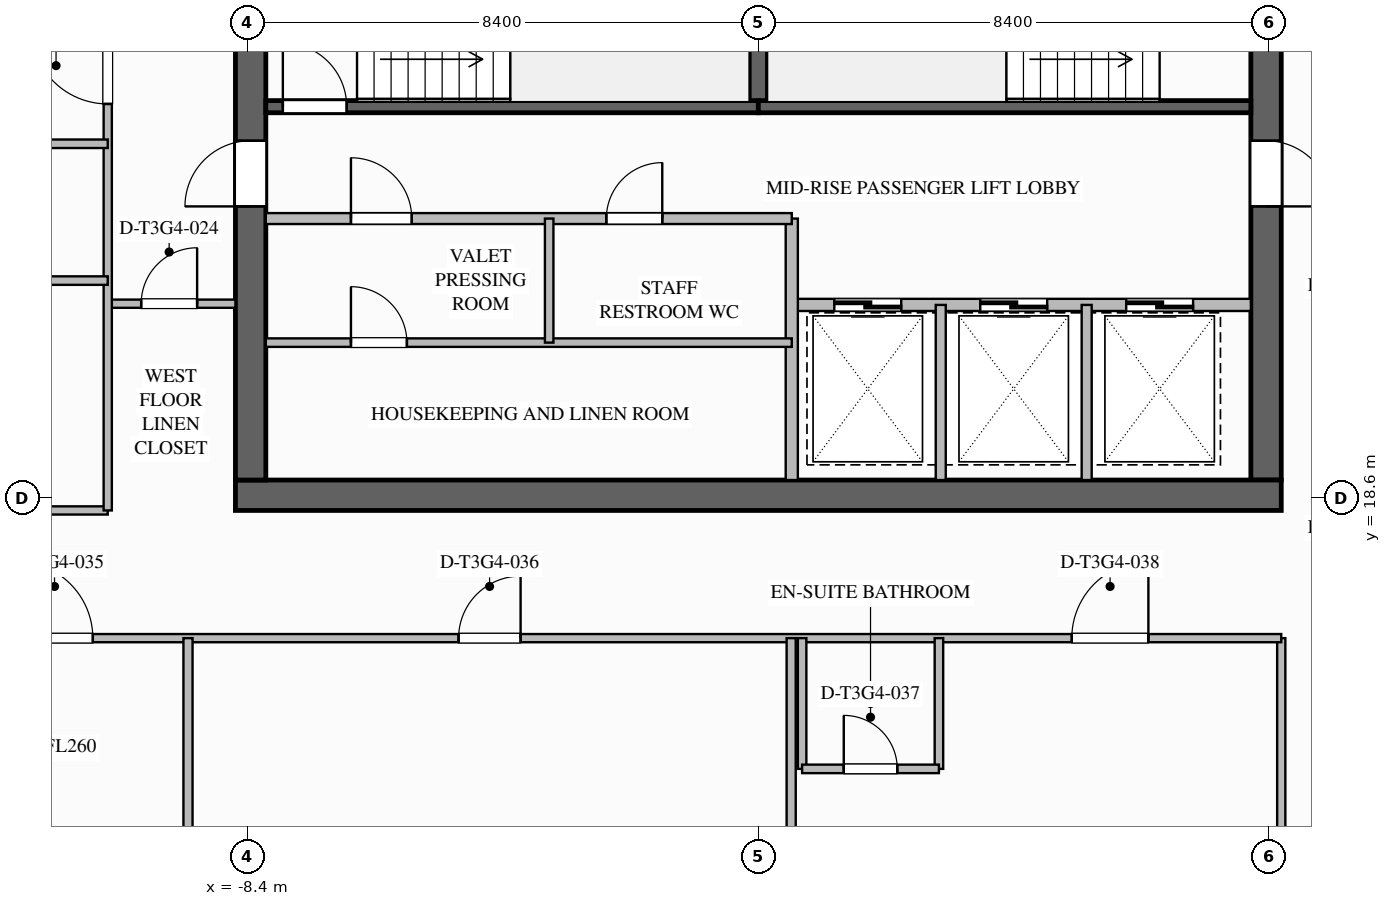
"""IFC4 building model, lengths in metres.
Left out: names, types, materials, properties, quantities, classifications, styles, units other than length and angle.
Written with IfcOpenShell. Run it as: python <this file> out.ifc"""

import sys

from ifc_helpers import new_model, si_unit, direction, frame, frame_2d, origin, place, context, subcontext, project, spatial, rectangle, extrude, element, fill, save


model = new_model("IFC4")
c1 = context("Model", 3, precision=1e-05, world=origin(), true_north=direction((0.0, 1.0)))
c2 = subcontext(c1, "Body", "Model", "MODEL_VIEW")
j1 = project(units=[si_unit("LENGTHUNIT", "METRE"), si_unit("PLANEANGLEUNIT", "RADIAN")], contexts=[c1])
p1 = place(None, origin())
s1 = spatial("IfcSite", under=j1, at=p1, CompositionType="ELEMENT")
p2 = place(p1, origin())
s2 = spatial("IfcBuilding", under=s1, at=p2, CompositionType="ELEMENT")
p3 = place(p2, frame((0.0, 0.0, 182.35)))
s3 = spatial("IfcBuildingStorey", under=s2, at=p3, CompositionType="ELEMENT", Elevation=182.35)
p4 = place(p3, frame((8.35, 35.1, 0.0), z_axis=(0.0, 0.0, 1.0), x_axis=(0.0, -1.0, 0.0)))
e1 = element("IfcWall", 1, at=p4, inside=s3, PredefinedType="SHEAR", context=c2, shape_type="SweptSolid", body=[
    extrude(rectangle(XDim=16.2, YDim=0.5, at=frame_2d((8.1, 0.0))), origin(), (0.0, 0.0, 1.0), 3.55),
])
p5 = place(p4, frame((3.08, 0.0, 0.0)))
e2 = element("IfcOpeningElement", 2, at=p5, cuts=e1, PredefinedType="OPENING", context=c2, shape_type="SweptSolid", body=[
    extrude(rectangle(XDim=1.12, YDim=2.1, at=frame_2d((0.56, 1.05))), frame((0.0, 0.26, 0.0), z_axis=(0.0, -1.0, 0.0), x_axis=(1.0, 0.0, 0.0)), (0.0, 0.0, 1.0), 0.52),
])
p6 = place(p4, frame((10.62, 0.0, 0.0)))
e3 = element("IfcOpeningElement", 3, at=p6, cuts=e1, PredefinedType="OPENING", context=c2, shape_type="SweptSolid", body=[
    extrude(rectangle(XDim=1.08, YDim=2.04, at=frame_2d((0.54, 1.02))), frame((0.0, 0.26, 0.0), z_axis=(0.0, -1.0, 0.0), x_axis=(1.0, 0.0, 0.0)), (0.0, 0.0, 1.0), 0.52),
])
p7 = place(p3, frame((8.6, 18.65, 0.0), z_axis=(0.0, 0.0, 1.0), x_axis=(-1.0, 0.0, 0.0)))
e4 = element("IfcWall", 4, at=p7, inside=s3, PredefinedType="SHEAR", context=c2, shape_type="SweptSolid", body=[
    extrude(rectangle(XDim=17.2, YDim=0.5, at=frame_2d((8.6, 0.0))), origin(), (0.0, 0.0, 1.0), 3.55),
])
p8 = place(p3, frame((-8.35, 18.9, 0.0), z_axis=(0.0, 0.0, 1.0), x_axis=(0.0, 1.0, 0.0)))
e5 = element("IfcWall", 5, at=p8, inside=s3, PredefinedType="SHEAR", context=c2, shape_type="SweptSolid", body=[
    extrude(rectangle(XDim=16.2, YDim=0.5, at=frame_2d((8.1, 0.0))), origin(), (0.0, 0.0, 1.0), 3.55),
])
p9 = place(p8, frame((12.02, 0.0, 0.0)))
e6 = element("IfcOpeningElement", 6, at=p9, cuts=e5, PredefinedType="OPENING", context=c2, shape_type="SweptSolid", body=[
    extrude(rectangle(XDim=1.08, YDim=2.04, at=frame_2d((0.54, 1.02))), frame((0.0, 0.26, 0.0), z_axis=(0.0, -1.0, 0.0), x_axis=(1.0, 0.0, 0.0)), (0.0, 0.0, 1.0), 0.52),
])
p10 = place(p8, frame((4.5, 0.0, 0.0)))
e7 = element("IfcOpeningElement", 7, at=p10, cuts=e5, PredefinedType="OPENING", context=c2, shape_type="SweptSolid", body=[
    extrude(rectangle(XDim=1.08, YDim=2.04, at=frame_2d((0.54, 1.02))), frame((0.0, 0.26, 0.0), z_axis=(0.0, -1.0, 0.0), x_axis=(1.0, 0.0, 0.0)), (0.0, 0.0, 1.0), 0.52),
])
p11 = place(p3, frame((0.0, 25.04, 0.0), z_axis=(0.0, 0.0, 1.0), x_axis=(0.0, 1.0, 0.0)))
e8 = element("IfcWall", 8, at=p11, inside=s3, PredefinedType="SOLIDWALL", context=c2, shape_type="SweptSolid", body=[
    extrude(rectangle(XDim=3.12, YDim=0.3, at=frame_2d((1.56, 0.0))), origin(), (0.0, 0.0, 1.0), 3.29),
])
p12 = place(p3, frame((-8.1, 25.04, 0.0), z_axis=(0.0, 0.0, 1.0), x_axis=(1.0, 0.0, 0.0)))
e9 = element("IfcWall", 9, at=p12, inside=s3, PredefinedType="SOLIDWALL", context=c2, shape_type="SweptSolid", body=[
    extrude(rectangle(XDim=8.1, YDim=0.2, at=frame_2d((4.05, 0.0))), origin(), (0.0, 0.0, 1.0), 3.29),
])
p13 = place(p12, frame((0.28, 0.0, 0.0)))
e10 = element("IfcOpeningElement", 10, at=p13, cuts=e9, PredefinedType="OPENING", context=c2, shape_type="SweptSolid", body=[
    extrude(rectangle(XDim=1.05, YDim=2.1, at=frame_2d((0.525, 1.05))), frame((0.0, 0.11, 0.0), z_axis=(0.0, -1.0, 0.0), x_axis=(1.0, 0.0, 0.0)), (0.0, 0.0, 1.0), 0.22),
])
p14 = place(p3, frame((0.0, 25.04, 0.0), z_axis=(0.0, 0.0, 1.0), x_axis=(1.0, 0.0, 0.0)))
e11 = element("IfcWall", 11, at=p14, inside=s3, PredefinedType="SOLIDWALL", context=c2, shape_type="SweptSolid", body=[
    extrude(rectangle(XDim=8.1, YDim=0.2, at=frame_2d((4.05, 0.0))), origin(), (0.0, 0.0, 1.0), 3.29),
])
p15 = place(p3, frame((8.1, 21.78, 0.0), z_axis=(0.0, 0.0, 1.0), x_axis=(-1.0, 0.0, 0.0)))
e12 = element("IfcWall", 12, at=p15, inside=s3, PredefinedType="SOLIDWALL", context=c2, shape_type="SweptSolid", body=[
    extrude(rectangle(XDim=7.55, YDim=0.2, at=frame_2d((3.775, 0.0))), origin(), (0.0, 0.0, 1.0), 3.29),
])
p16 = place(p15, frame((5.75, 0.0, 0.0)))
e13 = element("IfcOpeningElement", 13, at=p16, cuts=e12, PredefinedType="OPENING", context=c2, shape_type="SweptSolid", body=[
    extrude(rectangle(XDim=1.1, YDim=2.2, at=frame_2d((0.55, 1.1))), frame((0.0, 0.11, 0.0), z_axis=(0.0, -1.0, 0.0), x_axis=(1.0, 0.0, 0.0)), (0.0, 0.0, 1.0), 0.22),
])
p17 = place(p15, frame((3.35, 0.0, 0.0)))
e14 = element("IfcOpeningElement", 14, at=p17, cuts=e12, PredefinedType="OPENING", context=c2, shape_type="SweptSolid", body=[
    extrude(rectangle(XDim=1.1, YDim=2.2, at=frame_2d((0.55, 1.1))), frame((0.0, 0.11, 0.0), z_axis=(0.0, -1.0, 0.0), x_axis=(1.0, 0.0, 0.0)), (0.0, 0.0, 1.0), 0.22),
])
p18 = place(p15, frame((0.95, 0.0, 0.0)))
e15 = element("IfcOpeningElement", 15, at=p18, cuts=e12, PredefinedType="OPENING", context=c2, shape_type="SweptSolid", body=[
    extrude(rectangle(XDim=1.1, YDim=2.2, at=frame_2d((0.55, 1.1))), frame((0.0, 0.11, 0.0), z_axis=(0.0, -1.0, 0.0), x_axis=(1.0, 0.0, 0.0)), (0.0, 0.0, 1.0), 0.22),
])
p19 = place(p3, frame((0.55, 18.9, 0.0), z_axis=(0.0, 0.0, 1.0), x_axis=(0.0, 1.0, 0.0)))
e16 = element("IfcWall", 16, at=p19, inside=s3, PredefinedType="SOLIDWALL", context=c2, shape_type="SweptSolid", body=[
    extrude(rectangle(XDim=4.3, YDim=0.2, at=frame_2d((2.15, 0.0))), origin(), (0.0, 0.0, 1.0), 3.29),
])
for number, where, z_axis, x_axis in (
    (17, (3.0, 18.9, 0.0), (0.0, 0.0, 1.0), (0.0, 1.0, 0.0)),
    (18, (5.4, 18.9, 0.0), (0.0, 0.0, 1.0), (0.0, 1.0, 0.0)),
):
    element("IfcWall", number, at=place(p3, frame(where, z_axis=z_axis, x_axis=x_axis)), inside=s3, PredefinedType="PARTITIONING", context=c2, shape_type="SweptSolid", body=[
        extrude(rectangle(XDim=2.88, YDim=0.165, at=frame_2d((1.44, 0.0))), origin(), (0.0, 0.0, 1.0), 3.29),
    ])
p20 = place(p3, frame((-8.1, 23.2, 0.0), z_axis=(0.0, 0.0, 1.0), x_axis=(1.0, 0.0, 0.0)))
e19 = element("IfcWall", 19, at=p20, inside=s3, PredefinedType="SOLIDWALL", context=c2, shape_type="SweptSolid", body=[
    extrude(rectangle(XDim=8.65, YDim=0.18, at=frame_2d((4.325, 0.0))), origin(), (0.0, 0.0, 1.0), 3.29),
])
p21 = place(p20, frame((1.4, 0.0, 0.0)))
e20 = element("IfcOpeningElement", 20, at=p21, cuts=e19, PredefinedType="OPENING", context=c2, shape_type="SweptSolid", body=[
    extrude(rectangle(XDim=1.0, YDim=2.1, at=frame_2d((0.5, 1.05))), frame((0.0, 0.1, 0.0), z_axis=(0.0, -1.0, 0.0), x_axis=(1.0, 0.0, 0.0)), (0.0, 0.0, 1.0), 0.2),
])
p22 = place(p20, frame((5.6, 0.0, 0.0)))
e21 = element("IfcOpeningElement", 21, at=p22, cuts=e19, PredefinedType="OPENING", context=c2, shape_type="SweptSolid", body=[
    extrude(rectangle(XDim=0.92, YDim=2.1, at=frame_2d((0.46, 1.05))), frame((0.0, 0.1, 0.0), z_axis=(0.0, -1.0, 0.0), x_axis=(1.0, 0.0, 0.0)), (0.0, 0.0, 1.0), 0.2),
])
p23 = place(p3, frame((-8.1, 21.16, 0.0), z_axis=(0.0, 0.0, 1.0), x_axis=(1.0, 0.0, 0.0)))
e22 = element("IfcWall", 22, at=p23, inside=s3, PredefinedType="PLUMBINGWALL", context=c2, shape_type="SweptSolid", body=[
    extrude(rectangle(XDim=8.65, YDim=0.14, at=frame_2d((4.325, 0.0))), origin(), (0.0, 0.0, 1.0), 3.29),
])
p24 = place(p23, frame((1.4, 0.0, 0.0)))
e23 = element("IfcOpeningElement", 23, at=p24, cuts=e22, PredefinedType="OPENING", context=c2, shape_type="SweptSolid", body=[
    extrude(rectangle(XDim=0.92, YDim=2.1, at=frame_2d((0.46, 1.05))), frame((0.0, 0.08, 0.0), z_axis=(0.0, -1.0, 0.0), x_axis=(1.0, 0.0, 0.0)), (0.0, 0.0, 1.0), 0.16),
])
p25 = place(p3, frame((-3.44, 21.16, 0.0), z_axis=(0.0, 0.0, 1.0), x_axis=(0.0, 1.0, 0.0)))
e24 = element("IfcWall", 24, at=p25, inside=s3, PredefinedType="PLUMBINGWALL", context=c2, shape_type="SweptSolid", body=[
    extrude(rectangle(XDim=2.04, YDim=0.14, at=frame_2d((1.02, 0.0))), origin(), (0.0, 0.0, 1.0), 3.29),
])
p26 = place(p3, frame((-10.7, 21.8, 0.0), z_axis=(0.0, 0.0, 1.0), x_axis=(1.0, 0.0, 0.0)))
e25 = element("IfcWall", 25, at=p26, inside=s3, PredefinedType="PARTITIONING", context=c2, shape_type="SweptSolid", body=[
    extrude(rectangle(XDim=2.1, YDim=0.135, at=frame_2d((1.05, 0.0))), origin(), (0.0, 0.0, 1.0), 3.29),
])
p27 = place(p26, frame((0.55, 0.0, 0.0)))
e26 = element("IfcOpeningElement", 26, at=p27, cuts=e25, PredefinedType="OPENING", context=c2, shape_type="SweptSolid", body=[
    extrude(rectangle(XDim=0.92, YDim=2.1, at=frame_2d((0.46, 1.05))), frame((0.0, 0.077, 0.0), z_axis=(0.0, -1.0, 0.0), x_axis=(1.0, 0.0, 0.0)), (0.0, 0.0, 1.0), 0.155),
])
for number, where, z_axis, x_axis in (
    (27, (8.6, 10.8, 0.0), (0.0, 0.0, 1.0), (0.0, 1.0, 0.0)),
    (28, (-16.2, 18.4, 0.0), (0.0, 0.0, 1.0), (1.0, 0.0, 0.0)),
):
    element("IfcWall", number, at=place(p3, frame(where, z_axis=z_axis, x_axis=x_axis)), inside=s3, PredefinedType="PARTITIONING", context=c2, shape_type="SweptSolid", body=[
        extrude(rectangle(XDim=5.5, YDim=0.135, at=frame_2d((2.75, 0.0))), origin(), (0.0, 0.0, 1.0), 2.667),
    ])
p28 = place(p3, frame((-16.2, 16.3, 0.0), z_axis=(0.0, 0.0, 1.0), x_axis=(1.0, 0.0, 0.0)))
e29 = element("IfcWall", 29, at=p28, inside=s3, PredefinedType="PARTITIONING", context=c2, shape_type="SweptSolid", body=[
    extrude(rectangle(XDim=24.8, YDim=0.135, at=frame_2d((12.4, 0.0))), origin(), (0.0, 0.0, 1.0), 3.29),
])
p29 = place(p28, frame((3.995, 0.0, 0.0)))
e30 = element("IfcOpeningElement", 30, at=p29, cuts=e29, PredefinedType="OPENING", context=c2, shape_type="SweptSolid", body=[
    extrude(rectangle(XDim=1.26, YDim=2.2, at=frame_2d((0.63, 1.1))), frame((0.0, 0.077, 0.0), z_axis=(0.0, -1.0, 0.0), x_axis=(1.0, 0.0, 0.0)), (0.0, 0.0, 1.0), 0.155),
])
p30 = place(p28, frame((11.27, 0.0, 0.0)))
e31 = element("IfcOpeningElement", 31, at=p30, cuts=e29, PredefinedType="OPENING", context=c2, shape_type="SweptSolid", body=[
    extrude(rectangle(XDim=1.02, YDim=2.15, at=frame_2d((0.51, 1.075))), frame((0.0, 0.077, 0.0), z_axis=(0.0, -1.0, 0.0), x_axis=(1.0, 0.0, 0.0)), (0.0, 0.0, 1.0), 0.155),
])
p31 = place(p28, frame((21.355, 0.0, 0.0)))
e32 = element("IfcOpeningElement", 32, at=p31, cuts=e29, PredefinedType="OPENING", context=c2, shape_type="SweptSolid", body=[
    extrude(rectangle(XDim=1.26, YDim=2.2, at=frame_2d((0.63, 1.1))), frame((0.0, 0.077, 0.0), z_axis=(0.0, -1.0, 0.0), x_axis=(1.0, 0.0, 0.0)), (0.0, 0.0, 1.0), 0.155),
])
p32 = place(p3, frame((-10.7, 18.4, 0.0), z_axis=(0.0, 0.0, 1.0), x_axis=(0.0, 1.0, 0.0)))
e33 = element("IfcWall", 33, at=p32, inside=s3, PredefinedType="PARTITIONING", context=c2, shape_type="SweptSolid", body=[
    extrude(rectangle(XDim=17.2, YDim=0.135, at=frame_2d((8.6, 0.0))), origin(), (0.0, 0.0, 1.0), 3.29),
])
p33 = place(p32, frame((6.685, 0.0, 0.0)))
e34 = element("IfcOpeningElement", 34, at=p33, cuts=e33, PredefinedType="OPENING", context=c2, shape_type="SweptSolid", body=[
    extrude(rectangle(XDim=1.26, YDim=2.2, at=frame_2d((0.63, 1.1))), frame((0.0, 0.077, 0.0), z_axis=(0.0, -1.0, 0.0), x_axis=(1.0, 0.0, 0.0)), (0.0, 0.0, 1.0), 0.155),
])
p34 = place(p32, frame((10.59, 0.0, 0.0)))
e35 = element("IfcOpeningElement", 35, at=p34, cuts=e33, PredefinedType="OPENING", context=c2, shape_type="SweptSolid", body=[
    extrude(rectangle(XDim=1.02, YDim=2.15, at=frame_2d((0.51, 1.075))), frame((0.0, 0.077, 0.0), z_axis=(0.0, -1.0, 0.0), x_axis=(1.0, 0.0, 0.0)), (0.0, 0.0, 1.0), 0.155),
])
p35 = place(p3, frame((-9.38, 0.12, 0.0), z_axis=(0.0, 0.0, 1.0), x_axis=(0.0, 1.0, 0.0)))
e36 = element("IfcWall", 36, at=p35, inside=s3, PredefinedType="PARTITIONING", context=c2, shape_type="SweptSolid", body=[
    extrude(rectangle(XDim=16.18, YDim=0.15, at=frame_2d((8.09, 0.0))), origin(), (0.0, 0.0, 1.0), 3.29),
])
p36 = place(p3, frame((0.54, 0.8, 0.0), z_axis=(0.0, 0.0, 1.0), x_axis=(0.0, 1.0, 0.0)))
e37 = element("IfcWall", 37, at=p36, inside=s3, PredefinedType="PARTITIONING", context=c2, shape_type="SweptSolid", body=[
    extrude(rectangle(XDim=15.5, YDim=0.15, at=frame_2d((7.75, 0.0))), origin(), (0.0, 0.0, 1.0), 3.29),
])
for number, where, z_axis, x_axis in (
    (38, (0.72, 16.3, 0.0), (0.0, 0.0, 1.0), (0.0, -1.0, 0.0)),
    (39, (2.97, 16.3, 0.0), (0.0, 0.0, 1.0), (0.0, -1.0, 0.0)),
):
    element("IfcWall", number, at=place(p3, frame(where, z_axis=z_axis, x_axis=x_axis)), inside=s3, PredefinedType="PLUMBINGWALL", context=c2, shape_type="SweptSolid", body=[
        extrude(rectangle(XDim=2.15, YDim=0.14, at=frame_2d((1.075, 0.0))), origin(), (0.0, 0.0, 1.0), 3.29),
    ])
p37 = place(p3, frame((0.72, 14.15, 0.0), z_axis=(0.0, 0.0, 1.0), x_axis=(1.0, 0.0, 0.0)))
e40 = element("IfcWall", 40, at=p37, inside=s3, PredefinedType="PLUMBINGWALL", context=c2, shape_type="SweptSolid", body=[
    extrude(rectangle(XDim=2.25, YDim=0.14, at=frame_2d((1.125, 0.0))), origin(), (0.0, 0.0, 1.0), 3.29),
])
p38 = place(p37, frame((0.685, 0.0, 0.0)))
e41 = element("IfcOpeningElement", 41, at=p38, cuts=e40, PredefinedType="OPENING", context=c2, shape_type="SweptSolid", body=[
    extrude(rectangle(XDim=0.88, YDim=2.1, at=frame_2d((0.44, 1.05))), frame((0.0, 0.08, 0.0), z_axis=(0.0, -1.0, 0.0), x_axis=(1.0, 0.0, 0.0)), (0.0, 0.0, 1.0), 0.16),
])
for number, where, z_axis, x_axis in (
    (42, (-10.7, 22.18, 0.0), (0.0, 0.0, 1.0), (-1.0, 0.0, 0.0)),
    (43, (-10.7, 24.43, 0.0), (0.0, 0.0, 1.0), (-1.0, 0.0, 0.0)),
):
    element("IfcWall", number, at=place(p3, frame(where, z_axis=z_axis, x_axis=x_axis)), inside=s3, PredefinedType="PLUMBINGWALL", context=c2, shape_type="SweptSolid", body=[
        extrude(rectangle(XDim=2.15, YDim=0.14, at=frame_2d((1.075, 0.0))), origin(), (0.0, 0.0, 1.0), 3.29),
    ])
p39 = place(p13, origin())
e44 = element("IfcDoor", 44, at=p39, inside=s3, OperationType="SINGLE_SWING_LEFT", PredefinedType="DOOR", context=c2, shape_type="SweptSolid", body=[
    extrude(rectangle(XDim=1.05, YDim=2.1, at=frame_2d((0.525, 1.05))), frame((0.0, 0.025, 0.0), z_axis=(0.0, -1.0, 0.0), x_axis=(1.0, 0.0, 0.0)), (0.0, 0.0, 1.0), 0.05),
])
fill(e10, e44)
p40 = place(p16, origin())
e45 = element("IfcDoor", 45, at=p40, inside=s3, OperationType="SLIDING_TO_LEFT", PredefinedType="DOOR", context=c2, shape_type="SweptSolid", body=[
    extrude(rectangle(XDim=1.1, YDim=2.2, at=frame_2d((0.55, 1.1))), frame((0.0, 0.025, 0.0), z_axis=(0.0, -1.0, 0.0), x_axis=(1.0, 0.0, 0.0)), (0.0, 0.0, 1.0), 0.05),
])
fill(e13, e45)
p41 = place(p17, origin())
e46 = element("IfcDoor", 46, at=p41, inside=s3, OperationType="SLIDING_TO_LEFT", PredefinedType="DOOR", context=c2, shape_type="SweptSolid", body=[
    extrude(rectangle(XDim=1.1, YDim=2.2, at=frame_2d((0.55, 1.1))), frame((0.0, 0.025, 0.0), z_axis=(0.0, -1.0, 0.0), x_axis=(1.0, 0.0, 0.0)), (0.0, 0.0, 1.0), 0.05),
])
fill(e14, e46)
p42 = place(p18, origin())
e47 = element("IfcDoor", 47, at=p42, inside=s3, OperationType="SLIDING_TO_LEFT", PredefinedType="DOOR", context=c2, shape_type="SweptSolid", body=[
    extrude(rectangle(XDim=1.1, YDim=2.2, at=frame_2d((0.55, 1.1))), frame((0.0, 0.025, 0.0), z_axis=(0.0, -1.0, 0.0), x_axis=(1.0, 0.0, 0.0)), (0.0, 0.0, 1.0), 0.05),
])
fill(e15, e47)
p43 = place(p10, origin())
e48 = element("IfcDoor", 48, at=p43, inside=s3, OperationType="SINGLE_SWING_LEFT", PredefinedType="DOOR", context=c2, shape_type="SweptSolid", body=[
    extrude(rectangle(XDim=1.08, YDim=2.04, at=frame_2d((0.54, 1.02))), frame((0.0, 0.025, 0.0), z_axis=(0.0, -1.0, 0.0), x_axis=(1.0, 0.0, 0.0)), (0.0, 0.0, 1.0), 0.05),
])
fill(e7, e48)
p44 = place(p6, origin())
e49 = element("IfcDoor", 49, at=p44, inside=s3, OperationType="SINGLE_SWING_RIGHT", PredefinedType="DOOR", context=c2, shape_type="SweptSolid", body=[
    extrude(rectangle(XDim=1.08, YDim=2.04, at=frame_2d((0.54, 1.02))), frame((0.0, 0.025, 0.0), z_axis=(0.0, -1.0, 0.0), x_axis=(1.0, 0.0, 0.0)), (0.0, 0.0, 1.0), 0.05),
])
fill(e3, e49)
p45 = place(p21, origin())
e50 = element("IfcDoor", 50, at=p45, inside=s3, OperationType="SINGLE_SWING_LEFT", PredefinedType="DOOR", context=c2, shape_type="SweptSolid", body=[
    extrude(rectangle(XDim=1.0, YDim=2.1, at=frame_2d((0.5, 1.05))), frame((0.0, 0.025, 0.0), z_axis=(0.0, -1.0, 0.0), x_axis=(1.0, 0.0, 0.0)), (0.0, 0.0, 1.0), 0.05),
])
fill(e20, e50)
p46 = place(p22, origin())
e51 = element("IfcDoor", 51, at=p46, inside=s3, OperationType="SINGLE_SWING_RIGHT", PredefinedType="DOOR", context=c2, shape_type="SweptSolid", body=[
    extrude(rectangle(XDim=0.92, YDim=2.1, at=frame_2d((0.46, 1.05))), frame((0.0, 0.025, 0.0), z_axis=(0.0, -1.0, 0.0), x_axis=(1.0, 0.0, 0.0)), (0.0, 0.0, 1.0), 0.05),
])
fill(e21, e51)
p47 = place(p24, origin())
e52 = element("IfcDoor", 52, at=p47, inside=s3, OperationType="SINGLE_SWING_LEFT", PredefinedType="DOOR", context=c2, shape_type="SweptSolid", body=[
    extrude(rectangle(XDim=0.92, YDim=2.1, at=frame_2d((0.46, 1.05))), frame((0.0, 0.025, 0.0), z_axis=(0.0, -1.0, 0.0), x_axis=(1.0, 0.0, 0.0)), (0.0, 0.0, 1.0), 0.05),
])
fill(e23, e52)
p48 = place(p27, origin())
e53 = element("IfcDoor", 53, at=p48, inside=s3, OperationType="SINGLE_SWING_RIGHT", PredefinedType="DOOR", context=c2, shape_type="SweptSolid", body=[
    extrude(rectangle(XDim=0.92, YDim=2.1, at=frame_2d((0.46, 1.05))), frame((0.0, 0.025, 0.0), z_axis=(0.0, -1.0, 0.0), x_axis=(1.0, 0.0, 0.0)), (0.0, 0.0, 1.0), 0.05),
])
fill(e26, e53)
p49 = place(p29, origin())
e54 = element("IfcDoor", 54, at=p49, inside=s3, OperationType="SINGLE_SWING_LEFT", PredefinedType="DOOR", context=c2, shape_type="SweptSolid", body=[
    extrude(rectangle(XDim=1.26, YDim=2.2, at=frame_2d((0.63, 1.1))), frame((0.0, 0.025, 0.0), z_axis=(0.0, -1.0, 0.0), x_axis=(1.0, 0.0, 0.0)), (0.0, 0.0, 1.0), 0.05),
])
fill(e30, e54)
p50 = place(p30, origin())
e55 = element("IfcDoor", 55, at=p50, inside=s3, OperationType="SINGLE_SWING_RIGHT", PredefinedType="DOOR", context=c2, shape_type="SweptSolid", body=[
    extrude(rectangle(XDim=1.02, YDim=2.15, at=frame_2d((0.51, 1.075))), frame((0.0, 0.025, 0.0), z_axis=(0.0, -1.0, 0.0), x_axis=(1.0, 0.0, 0.0)), (0.0, 0.0, 1.0), 0.05),
])
fill(e31, e55)
p51 = place(p38, origin())
e56 = element("IfcDoor", 56, at=p51, inside=s3, OperationType="SINGLE_SWING_LEFT", PredefinedType="DOOR", context=c2, shape_type="SweptSolid", body=[
    extrude(rectangle(XDim=0.88, YDim=2.1, at=frame_2d((0.44, 1.05))), frame((0.0, 0.025, 0.0), z_axis=(0.0, -1.0, 0.0), x_axis=(1.0, 0.0, 0.0)), (0.0, 0.0, 1.0), 0.05),
])
fill(e41, e56)
p52 = place(p31, origin())
e57 = element("IfcDoor", 57, at=p52, inside=s3, OperationType="SINGLE_SWING_RIGHT", PredefinedType="DOOR", context=c2, shape_type="SweptSolid", body=[
    extrude(rectangle(XDim=1.26, YDim=2.2, at=frame_2d((0.63, 1.1))), frame((0.0, 0.025, 0.0), z_axis=(0.0, -1.0, 0.0), x_axis=(1.0, 0.0, 0.0)), (0.0, 0.0, 1.0), 0.05),
])
fill(e32, e57)
p53 = place(p33, origin())
e58 = element("IfcDoor", 58, at=p53, inside=s3, OperationType="SINGLE_SWING_RIGHT", PredefinedType="DOOR", context=c2, shape_type="SweptSolid", body=[
    extrude(rectangle(XDim=1.26, YDim=2.2, at=frame_2d((0.63, 1.1))), frame((0.0, 0.025, 0.0), z_axis=(0.0, -1.0, 0.0), x_axis=(1.0, 0.0, 0.0)), (0.0, 0.0, 1.0), 0.05),
])
fill(e34, e58)
save(model, sys.argv[1])
